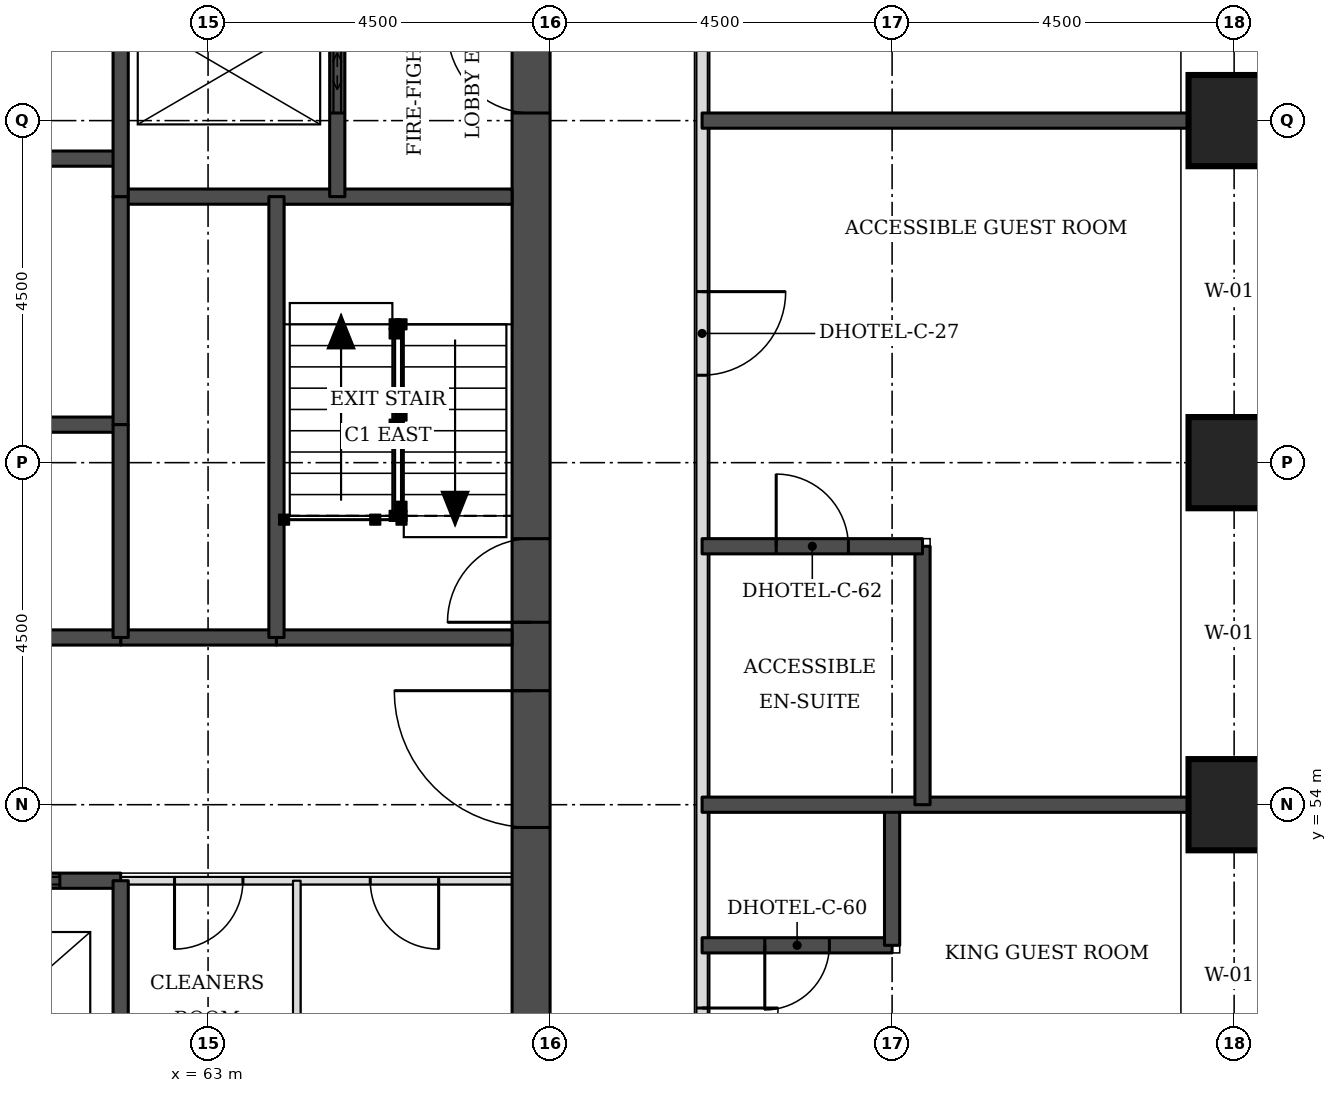
"""IFC4 building model, lengths in metres.
Left out: names, types, materials, properties, quantities, classifications, styles, units other than length and angle.
Written with IfcOpenShell. Run it as: python <this file> out.ifc"""

import sys

from ifc_helpers import new_model, si_unit, direction, frame, frame_2d, origin, origin_2d, place, context, subcontext, project, spatial, rectangle, extrude, element, fill, save


model = new_model("IFC4")
c1 = context("Model", 3, precision=1e-05, world=origin(), true_north=direction((0.0, 1.0)))
c2 = subcontext(c1, "Body", "Model", "MODEL_VIEW")
j1 = project(units=[si_unit("LENGTHUNIT", "METRE"), si_unit("PLANEANGLEUNIT", "RADIAN")], contexts=[c1])
p1 = place(None, origin())
s1 = spatial("IfcSite", under=j1, at=p1, CompositionType="ELEMENT")
p2 = place(p1, origin())
s2 = spatial("IfcBuilding", under=s1, at=p2, CompositionType="ELEMENT")
p3 = place(p2, frame((0.0, 0.0, 56.1)))
s3 = spatial("IfcBuildingStorey", under=s2, at=p3, CompositionType="ELEMENT", Elevation=56.1)
for number, where, z_axis, x_axis in (
    (1, (76.5, 54.0, 0.0), (0.0, 0.0, 1.0), (1.0, 0.0, 0.0)),
    (2, (76.5, 58.5, 0.0), (0.0, 0.0, 1.0), (1.0, 0.0, 0.0)),
    (3, (76.5, 63.0, 0.0), (0.0, 0.0, 1.0), (1.0, 0.0, 0.0)),
):
    element("IfcColumn", number, at=place(p3, frame(where, z_axis=z_axis, x_axis=x_axis)), inside=s3, PredefinedType="COLUMN", context=c2, shape_type="SweptSolid", body=[
        extrude(rectangle(XDim=1.2, YDim=1.2, at=origin_2d()), origin(), (0.0, 0.0, 1.0), 3.3),
    ])
p4 = place(p3, frame((67.25, 49.5, 0.0), z_axis=(0.0, 0.0, 1.0), x_axis=(0.0, 1.0, 0.0)))
e4 = element("IfcWall", 4, at=p4, inside=s3, PredefinedType="SHEAR", context=c2, shape_type="SweptSolid", body=[
    extrude(rectangle(XDim=22.5, YDim=0.5, at=frame_2d((11.25, 0.0))), origin(), (0.0, 0.0, 1.0), 3.3),
])
p5 = place(p4, frame((4.2, 0.0, 0.0)))
e5 = element("IfcOpeningElement", 5, at=p5, cuts=e4, PredefinedType="OPENING", context=c2, shape_type="SweptSolid", body=[
    extrude(rectangle(XDim=1.8, YDim=2.1, at=frame_2d((0.9, 1.05))), frame((0.0, 0.26, 0.0), z_axis=(0.0, -1.0, 0.0), x_axis=(1.0, 0.0, 0.0)), (0.0, 0.0, 1.0), 0.52),
])
p6 = place(p4, frame((6.9, 0.0, 0.0)))
e6 = element("IfcOpeningElement", 6, at=p6, cuts=e4, PredefinedType="OPENING", context=c2, shape_type="SweptSolid", body=[
    extrude(rectangle(XDim=1.1, YDim=2.1, at=frame_2d((0.55, 1.05))), frame((0.0, 0.26, 0.0), z_axis=(0.0, -1.0, 0.0), x_axis=(1.0, 0.0, 0.0)), (0.0, 0.0, 1.0), 0.52),
])
p7 = place(p4, frame((13.6, 0.0, 0.0)))
e7 = element("IfcOpeningElement", 7, at=p7, cuts=e4, PredefinedType="OPENING", context=c2, shape_type="SweptSolid", body=[
    extrude(rectangle(XDim=1.1, YDim=2.1, at=frame_2d((0.55, 1.05))), frame((0.0, 0.26, 0.0), z_axis=(0.0, -1.0, 0.0), x_axis=(1.0, 0.0, 0.0)), (0.0, 0.0, 1.0), 0.52),
])
p8 = place(p4, frame((16.5, 0.0, 0.0)))
e8 = element("IfcOpeningElement", 8, at=p8, cuts=e4, PredefinedType="OPENING", context=c2, shape_type="SweptSolid", body=[
    extrude(rectangle(XDim=1.8, YDim=2.1, at=frame_2d((0.9, 1.05))), frame((0.0, 0.26, 0.0), z_axis=(0.0, -1.0, 0.0), x_axis=(1.0, 0.0, 0.0)), (0.0, 0.0, 1.0), 0.52),
])
p9 = place(p3, frame((69.5, 47.5, 0.0), z_axis=(0.0, 0.0, 1.0), x_axis=(0.0, 1.0, 0.0)))
e9 = element("IfcWall", 9, at=p9, inside=s3, PredefinedType="PARTITIONING", context=c2, shape_type="SweptSolid", body=[
    extrude(rectangle(XDim=26.5, YDim=0.15, at=frame_2d((13.25, 0.0))), origin(), (0.0, 0.0, 1.0), 3.08),
])
p10 = place(p9, frame((25.053, 0.0, 0.0)))
e10 = element("IfcOpeningElement", 10, at=p10, cuts=e9, PredefinedType="OPENING", context=c2, shape_type="SweptSolid", body=[
    extrude(rectangle(XDim=1.0, YDim=2.1, at=frame_2d((0.5, 1.05))), frame((0.0, 0.085, 0.0), z_axis=(0.0, -1.0, 0.0), x_axis=(1.0, 0.0, 0.0)), (0.0, 0.0, 1.0), 0.17),
])
p11 = place(p9, frame((18.275, 0.0, 0.0)))
e11 = element("IfcOpeningElement", 11, at=p11, cuts=e9, PredefinedType="OPENING", context=c2, shape_type="SweptSolid", body=[
    extrude(rectangle(XDim=1.0, YDim=2.1, at=frame_2d((0.5, 1.05))), frame((0.0, 0.085, 0.0), z_axis=(0.0, -1.0, 0.0), x_axis=(1.0, 0.0, 0.0)), (0.0, 0.0, 1.0), 0.17),
])
p12 = place(p9, frame((12.15, 0.0, 0.0)))
e12 = element("IfcOpeningElement", 12, at=p12, cuts=e9, PredefinedType="OPENING", context=c2, shape_type="SweptSolid", body=[
    extrude(rectangle(XDim=1.1, YDim=2.1, at=frame_2d((0.55, 1.05))), frame((0.0, 0.085, 0.0), z_axis=(0.0, -1.0, 0.0), x_axis=(1.0, 0.0, 0.0)), (0.0, 0.0, 1.0), 0.17),
])
p13 = place(p9, frame((2.825, 0.0, 0.0)))
e13 = element("IfcOpeningElement", 13, at=p13, cuts=e9, PredefinedType="OPENING", context=c2, shape_type="SweptSolid", body=[
    extrude(rectangle(XDim=1.0, YDim=2.1, at=frame_2d((0.5, 1.05))), frame((0.0, 0.085, 0.0), z_axis=(0.0, -1.0, 0.0), x_axis=(1.0, 0.0, 0.0)), (0.0, 0.0, 1.0), 0.17),
])
p14 = place(p9, frame((0.447, 0.0, 0.0)))
e14 = element("IfcOpeningElement", 14, at=p14, cuts=e9, PredefinedType="OPENING", context=c2, shape_type="SweptSolid", body=[
    extrude(rectangle(XDim=1.0, YDim=2.1, at=frame_2d((0.5, 1.05))), frame((0.0, 0.085, 0.0), z_axis=(0.0, -1.0, 0.0), x_axis=(1.0, 0.0, 0.0)), (0.0, 0.0, 1.0), 0.17),
])
p15 = place(p3, frame((69.5, 52.15, 0.0), z_axis=(0.0, 0.0, 1.0), x_axis=(1.0, 0.0, 0.0)))
e15 = element("IfcWall", 15, at=p15, inside=s3, PredefinedType="SOLIDWALL", context=c2, shape_type="SweptSolid", body=[
    extrude(rectangle(XDim=2.5, YDim=0.2, at=frame_2d((1.25, 0.0))), origin(), (0.0, 0.0, 1.0), 3.08),
])
p16 = place(p15, frame((0.825, 0.0, 0.0)))
e16 = element("IfcOpeningElement", 16, at=p16, cuts=e15, PredefinedType="OPENING", context=c2, shape_type="SweptSolid", body=[
    extrude(rectangle(XDim=0.85, YDim=2.1, at=frame_2d((0.425, 1.05))), frame((0.0, 0.11, 0.0), z_axis=(0.0, -1.0, 0.0), x_axis=(1.0, 0.0, 0.0)), (0.0, 0.0, 1.0), 0.22),
])
p17 = place(p3, frame((72.0, 52.15, 0.0), z_axis=(0.0, 0.0, 1.0), x_axis=(0.0, 1.0, 0.0)))
e17 = element("IfcWall", 17, at=p17, inside=s3, PredefinedType="SOLIDWALL", context=c2, shape_type="SweptSolid", body=[
    extrude(rectangle(XDim=1.85, YDim=0.2, at=frame_2d((0.925, 0.0))), origin(), (0.0, 0.0, 1.0), 3.08),
])
p18 = place(p3, frame((69.5, 54.0, 0.0), z_axis=(0.0, 0.0, 1.0), x_axis=(1.0, 0.0, 0.0)))
e18 = element("IfcWall", 18, at=p18, inside=s3, PredefinedType="SOLIDWALL", context=c2, shape_type="SweptSolid", body=[
    extrude(rectangle(XDim=6.4, YDim=0.2, at=frame_2d((3.2, 0.0))), origin(), (0.0, 0.0, 1.0), 3.08),
])
p19 = place(p3, frame((72.4, 54.0, 0.0), z_axis=(0.0, 0.0, 1.0), x_axis=(0.0, 1.0, 0.0)))
e19 = element("IfcWall", 19, at=p19, inside=s3, PredefinedType="SOLIDWALL", context=c2, shape_type="SweptSolid", body=[
    extrude(rectangle(XDim=3.4, YDim=0.2, at=frame_2d((1.7, 0.0))), origin(), (0.0, 0.0, 1.0), 3.08),
])
p20 = place(p3, frame((69.5, 57.4, 0.0), z_axis=(0.0, 0.0, 1.0), x_axis=(1.0, 0.0, 0.0)))
e20 = element("IfcWall", 20, at=p20, inside=s3, PredefinedType="SOLIDWALL", context=c2, shape_type="SweptSolid", body=[
    extrude(rectangle(XDim=2.9, YDim=0.2, at=frame_2d((1.45, 0.0))), origin(), (0.0, 0.0, 1.0), 3.08),
])
p21 = place(p20, frame((0.975, 0.0, 0.0)))
e21 = element("IfcOpeningElement", 21, at=p21, cuts=e20, PredefinedType="OPENING", context=c2, shape_type="SweptSolid", body=[
    extrude(rectangle(XDim=0.95, YDim=2.1, at=frame_2d((0.475, 1.05))), frame((0.0, 0.11, 0.0), z_axis=(0.0, -1.0, 0.0), x_axis=(1.0, 0.0, 0.0)), (0.0, 0.0, 1.0), 0.22),
])
p22 = place(p3, frame((69.5, 63.0, 0.0), z_axis=(0.0, 0.0, 1.0), x_axis=(1.0, 0.0, 0.0)))
e22 = element("IfcWall", 22, at=p22, inside=s3, PredefinedType="SOLIDWALL", context=c2, shape_type="SweptSolid", body=[
    extrude(rectangle(XDim=6.4, YDim=0.2, at=frame_2d((3.2, 0.0))), origin(), (0.0, 0.0, 1.0), 3.08),
])
p23 = place(p3, frame((61.85, 53.0, 0.0), z_axis=(0.0, 0.0, 1.0), x_axis=(1.0, 0.0, 0.0)))
e23 = element("IfcWall", 23, at=p23, inside=s3, PredefinedType="PARTITIONING", context=c2, shape_type="SweptSolid", body=[
    extrude(rectangle(XDim=5.15, YDim=0.1, at=frame_2d((2.575, 0.0))), origin(), (0.0, 0.0, 1.0), 3.08),
])
p24 = place(p23, frame((3.284, 0.0, 0.0)))
e24 = element("IfcOpeningElement", 24, at=p24, cuts=e23, PredefinedType="OPENING", context=c2, shape_type="SweptSolid", body=[
    extrude(rectangle(XDim=0.9, YDim=2.1, at=frame_2d((0.45, 1.05))), frame((0.0, 0.06, 0.0), z_axis=(0.0, -1.0, 0.0), x_axis=(1.0, 0.0, 0.0)), (0.0, 0.0, 1.0), 0.12),
])
p25 = place(p23, frame((0.709, 0.0, 0.0)))
e25 = element("IfcOpeningElement", 25, at=p25, cuts=e23, PredefinedType="OPENING", context=c2, shape_type="SweptSolid", body=[
    extrude(rectangle(XDim=0.9, YDim=2.1, at=frame_2d((0.45, 1.05))), frame((0.0, 0.06, 0.0), z_axis=(0.0, -1.0, 0.0), x_axis=(1.0, 0.0, 0.0)), (0.0, 0.0, 1.0), 0.12),
])
p26 = place(p3, frame((50.65, 53.0, 0.0), z_axis=(0.0, 0.0, 1.0), x_axis=(1.0, 0.0, 0.0)))
e26 = element("IfcWall", 26, at=p26, inside=s3, PredefinedType="SOLIDWALL", context=c2, shape_type="SweptSolid", body=[
    extrude(rectangle(XDim=11.2, YDim=0.2, at=frame_2d((5.6, 0.0))), origin(), (0.0, 0.0, 1.0), 3.08),
])
p27 = place(p26, frame((0.8, 0.0, 0.0)))
e27 = element("IfcOpeningElement", 27, at=p27, cuts=e26, PredefinedType="OPENING", context=c2, shape_type="SweptSolid", body=[
    extrude(rectangle(XDim=1.2, YDim=2.1, at=frame_2d((0.6, 1.05))), frame((0.0, 0.11, 0.0), z_axis=(0.0, -1.0, 0.0), x_axis=(1.0, 0.0, 0.0)), (0.0, 0.0, 1.0), 0.22),
])
p28 = place(p26, frame((3.6, 0.0, 0.0)))
e28 = element("IfcOpeningElement", 28, at=p28, cuts=e26, PredefinedType="OPENING", context=c2, shape_type="SweptSolid", body=[
    extrude(rectangle(XDim=1.2, YDim=2.1, at=frame_2d((0.6, 1.05))), frame((0.0, 0.11, 0.0), z_axis=(0.0, -1.0, 0.0), x_axis=(1.0, 0.0, 0.0)), (0.0, 0.0, 1.0), 0.22),
])
p29 = place(p26, frame((6.4, 0.0, 0.0)))
e29 = element("IfcOpeningElement", 29, at=p29, cuts=e26, PredefinedType="OPENING", context=c2, shape_type="SweptSolid", body=[
    extrude(rectangle(XDim=1.2, YDim=2.1, at=frame_2d((0.6, 1.05))), frame((0.0, 0.11, 0.0), z_axis=(0.0, -1.0, 0.0), x_axis=(1.0, 0.0, 0.0)), (0.0, 0.0, 1.0), 0.22),
])
p30 = place(p26, frame((9.2, 0.0, 0.0)))
e30 = element("IfcOpeningElement", 30, at=p30, cuts=e26, PredefinedType="OPENING", context=c2, shape_type="SweptSolid", body=[
    extrude(rectangle(XDim=1.2, YDim=2.1, at=frame_2d((0.6, 1.05))), frame((0.0, 0.11, 0.0), z_axis=(0.0, -1.0, 0.0), x_axis=(1.0, 0.0, 0.0)), (0.0, 0.0, 1.0), 0.22),
])
p31 = place(p3, frame((61.85, 56.2, 0.0), z_axis=(0.0, 0.0, 1.0), x_axis=(1.0, 0.0, 0.0)))
e31 = element("IfcWall", 31, at=p31, inside=s3, PredefinedType="SOLIDWALL", context=c2, shape_type="SweptSolid", body=[
    extrude(rectangle(XDim=2.05, YDim=0.2, at=frame_2d((1.025, 0.0))), origin(), (0.0, 0.0, 1.0), 3.08),
])
p32 = place(p3, frame((50.65, 56.2, 0.0), z_axis=(0.0, 0.0, 1.0), x_axis=(1.0, 0.0, 0.0)))
e32 = element("IfcWall", 32, at=p32, inside=s3, PredefinedType="SOLIDWALL", context=c2, shape_type="SweptSolid", body=[
    extrude(rectangle(XDim=11.2, YDim=0.2, at=frame_2d((5.6, 0.0))), origin(), (0.0, 0.0, 1.0), 3.08),
])
p33 = place(p3, frame((63.9, 56.2, 0.0), z_axis=(0.0, 0.0, 1.0), x_axis=(1.0, 0.0, 0.0)))
e33 = element("IfcWall", 33, at=p33, inside=s3, PredefinedType="SOLIDWALL", context=c2, shape_type="SweptSolid", body=[
    extrude(rectangle(XDim=3.1, YDim=0.2, at=frame_2d((1.55, 0.0))), origin(), (0.0, 0.0, 1.0), 3.08),
])
p34 = place(p3, frame((50.65, 59.0, 0.0), z_axis=(0.0, 0.0, 1.0), x_axis=(1.0, 0.0, 0.0)))
e34 = element("IfcWall", 34, at=p34, inside=s3, PredefinedType="SOLIDWALL", context=c2, shape_type="SweptSolid", body=[
    extrude(rectangle(XDim=11.2, YDim=0.2, at=frame_2d((5.6, 0.0))), origin(), (0.0, 0.0, 1.0), 3.3),
])
p35 = place(p3, frame((61.85, 62.0, 0.0), z_axis=(0.0, 0.0, 1.0), x_axis=(1.0, 0.0, 0.0)))
e35 = element("IfcWall", 35, at=p35, inside=s3, PredefinedType="SOLIDWALL", context=c2, shape_type="SweptSolid", body=[
    extrude(rectangle(XDim=5.15, YDim=0.2, at=frame_2d((2.575, 0.0))), origin(), (0.0, 0.0, 1.0), 3.08),
])
p36 = place(p3, frame((50.65, 62.5, 0.0), z_axis=(0.0, 0.0, 1.0), x_axis=(1.0, 0.0, 0.0)))
e36 = element("IfcWall", 36, at=p36, inside=s3, PredefinedType="SOLIDWALL", context=c2, shape_type="SweptSolid", body=[
    extrude(rectangle(XDim=11.2, YDim=0.2, at=frame_2d((5.6, 0.0))), origin(), (0.0, 0.0, 1.0), 3.3),
])
p37 = place(p3, frame((61.85, 59.0, 0.0), z_axis=(0.0, 0.0, 1.0), x_axis=(0.0, 1.0, 0.0)))
e37 = element("IfcWall", 37, at=p37, inside=s3, PredefinedType="SOLIDWALL", context=c2, shape_type="SweptSolid", body=[
    extrude(rectangle(XDim=3.0, YDim=0.2, at=frame_2d((1.5, 0.0))), origin(), (0.0, 0.0, 1.0), 3.3),
])
p38 = place(p3, frame((61.85, 50.0, 0.0), z_axis=(0.0, 0.0, 1.0), x_axis=(0.0, 1.0, 0.0)))
e38 = element("IfcWall", 38, at=p38, inside=s3, PredefinedType="SOLIDWALL", context=c2, shape_type="SweptSolid", body=[
    extrude(rectangle(XDim=3.0, YDim=0.2, at=frame_2d((1.5, 0.0))), origin(), (0.0, 0.0, 1.0), 3.08),
])
p39 = place(p3, frame((61.85, 56.2, 0.0), z_axis=(0.0, 0.0, 1.0), x_axis=(0.0, 1.0, 0.0)))
e39 = element("IfcWall", 39, at=p39, inside=s3, PredefinedType="SOLIDWALL", context=c2, shape_type="SweptSolid", body=[
    extrude(rectangle(XDim=2.8, YDim=0.2, at=frame_2d((1.4, 0.0))), origin(), (0.0, 0.0, 1.0), 3.08),
])
p40 = place(p3, frame((61.85, 62.0, 0.0), z_axis=(0.0, 0.0, 1.0), x_axis=(0.0, 1.0, 0.0)))
e40 = element("IfcWall", 40, at=p40, inside=s3, PredefinedType="SOLIDWALL", context=c2, shape_type="SweptSolid", body=[
    extrude(rectangle(XDim=3.3, YDim=0.2, at=frame_2d((1.65, 0.0))), origin(), (0.0, 0.0, 1.0), 3.08),
])
p41 = place(p3, frame((63.9, 56.2, 0.0), z_axis=(0.0, 0.0, 1.0), x_axis=(0.0, 1.0, 0.0)))
e41 = element("IfcWall", 41, at=p41, inside=s3, PredefinedType="SOLIDWALL", context=c2, shape_type="SweptSolid", body=[
    extrude(rectangle(XDim=5.8, YDim=0.2, at=frame_2d((2.9, 0.0))), origin(), (0.0, 0.0, 1.0), 3.08),
])
p42 = place(p3, frame((64.167, 50.0, 0.0), z_axis=(0.0, 0.0, 1.0), x_axis=(0.0, 1.0, 0.0)))
e42 = element("IfcWall", 42, at=p42, inside=s3, PredefinedType="PARTITIONING", context=c2, shape_type="SweptSolid", body=[
    extrude(rectangle(XDim=3.0, YDim=0.1, at=frame_2d((1.5, 0.0))), origin(), (0.0, 0.0, 1.0), 3.08),
])
p43 = place(p3, frame((64.7, 62.0, 0.0), z_axis=(0.0, 0.0, 1.0), x_axis=(0.0, 1.0, 0.0)))
e43 = element("IfcWall", 43, at=p43, inside=s3, PredefinedType="SOLIDWALL", context=c2, shape_type="SweptSolid", body=[
    extrude(rectangle(XDim=3.3, YDim=0.2, at=frame_2d((1.65, 0.0))), origin(), (0.0, 0.0, 1.0), 3.08),
])
p44 = place(p43, frame((1.1, 0.0, 0.0)))
e44 = element("IfcOpeningElement", 44, at=p44, cuts=e43, PredefinedType="OPENING", context=c2, shape_type="SweptSolid", body=[
    extrude(rectangle(XDim=1.1, YDim=2.1, at=frame_2d((0.55, 1.05))), frame((0.0, 0.11, 0.0), z_axis=(0.0, -1.0, 0.0), x_axis=(1.0, 0.0, 0.0)), (0.0, 0.0, 1.0), 0.22),
])
p45 = place(p12, frame((1.1, 0.0, 0.0), z_axis=(0.0, 0.0, 1.0), x_axis=(-1.0, 0.0, 0.0)))
e45 = element("IfcDoor", 45, at=p45, inside=s3, OperationType="SINGLE_SWING_LEFT", PredefinedType="DOOR", context=c2, shape_type="SweptSolid", body=[
    extrude(rectangle(XDim=1.1, YDim=2.1, at=frame_2d((0.55, 1.05))), frame((0.0, 0.025, 0.0), z_axis=(0.0, -1.0, 0.0), x_axis=(1.0, 0.0, 0.0)), (0.0, 0.0, 1.0), 0.05),
])
fill(e12, e45)
p46 = place(p21, origin())
e46 = element("IfcDoor", 46, at=p46, inside=s3, OperationType="SINGLE_SWING_LEFT", PredefinedType="DOOR", context=c2, shape_type="SweptSolid", body=[
    extrude(rectangle(XDim=0.95, YDim=2.1, at=frame_2d((0.475, 1.05))), frame((0.0, 0.025, 0.0), z_axis=(0.0, -1.0, 0.0), x_axis=(1.0, 0.0, 0.0)), (0.0, 0.0, 1.0), 0.05),
])
fill(e21, e46)
p47 = place(p13, frame((1.0, 0.0, 0.0), z_axis=(0.0, 0.0, 1.0), x_axis=(-1.0, 0.0, 0.0)))
e47 = element("IfcDoor", 47, at=p47, inside=s3, OperationType="SINGLE_SWING_LEFT", PredefinedType="DOOR", context=c2, shape_type="SweptSolid", body=[
    extrude(rectangle(XDim=1.0, YDim=2.1, at=frame_2d((0.5, 1.05))), frame((0.0, 0.025, 0.0), z_axis=(0.0, -1.0, 0.0), x_axis=(1.0, 0.0, 0.0)), (0.0, 0.0, 1.0), 0.05),
])
fill(e13, e47)
p48 = place(p16, frame((0.85, 0.0, 0.0), z_axis=(0.0, 0.0, 1.0), x_axis=(-1.0, 0.0, 0.0)))
e48 = element("IfcDoor", 48, at=p48, inside=s3, OperationType="SINGLE_SWING_RIGHT", PredefinedType="DOOR", context=c2, shape_type="SweptSolid", body=[
    extrude(rectangle(XDim=0.85, YDim=2.1, at=frame_2d((0.425, 1.05))), frame((0.0, 0.025, 0.0), z_axis=(0.0, -1.0, 0.0), x_axis=(1.0, 0.0, 0.0)), (0.0, 0.0, 1.0), 0.05),
])
fill(e16, e48)
p49 = place(p30, origin())
e49 = element("IfcDoor", 49, at=p49, inside=s3, OperationType="DOUBLE_DOOR_SLIDING", PredefinedType="DOOR", context=c2, shape_type="SweptSolid", body=[
    extrude(rectangle(XDim=1.2, YDim=2.1, at=frame_2d((0.6, 1.05))), frame((0.0, 0.025, 0.0), z_axis=(0.0, -1.0, 0.0), x_axis=(1.0, 0.0, 0.0)), (0.0, 0.0, 1.0), 0.05),
])
fill(e30, e49)
p50 = place(p44, origin())
e50 = element("IfcDoor", 50, at=p50, inside=s3, OperationType="DOUBLE_DOOR_SLIDING", PredefinedType="DOOR", context=c2, shape_type="SweptSolid", body=[
    extrude(rectangle(XDim=1.1, YDim=2.1, at=frame_2d((0.55, 1.05))), frame((0.0, 0.025, 0.0), z_axis=(0.0, -1.0, 0.0), x_axis=(1.0, 0.0, 0.0)), (0.0, 0.0, 1.0), 0.05),
])
fill(e44, e50)
p51 = place(p5, origin())
e51 = element("IfcDoor", 51, at=p51, inside=s3, OperationType="SINGLE_SWING_RIGHT", PredefinedType="DOOR", context=c2, shape_type="SweptSolid", body=[
    extrude(rectangle(XDim=1.8, YDim=2.1, at=frame_2d((0.9, 1.05))), frame((0.0, 0.025, 0.0), z_axis=(0.0, -1.0, 0.0), x_axis=(1.0, 0.0, 0.0)), (0.0, 0.0, 1.0), 0.05),
])
fill(e5, e51)
p52 = place(p6, origin())
e52 = element("IfcDoor", 52, at=p52, inside=s3, OperationType="SINGLE_SWING_LEFT", PredefinedType="DOOR", context=c2, shape_type="SweptSolid", body=[
    extrude(rectangle(XDim=1.1, YDim=2.1, at=frame_2d((0.55, 1.05))), frame((0.0, 0.025, 0.0), z_axis=(0.0, -1.0, 0.0), x_axis=(1.0, 0.0, 0.0)), (0.0, 0.0, 1.0), 0.05),
])
fill(e6, e52)
p53 = place(p7, origin())
e53 = element("IfcDoor", 53, at=p53, inside=s3, OperationType="SINGLE_SWING_RIGHT", PredefinedType="DOOR", context=c2, shape_type="SweptSolid", body=[
    extrude(rectangle(XDim=1.1, YDim=2.1, at=frame_2d((0.55, 1.05))), frame((0.0, 0.025, 0.0), z_axis=(0.0, -1.0, 0.0), x_axis=(1.0, 0.0, 0.0)), (0.0, 0.0, 1.0), 0.05),
])
fill(e7, e53)
p54 = place(p24, frame((0.9, 0.0, 0.0), z_axis=(0.0, 0.0, 1.0), x_axis=(-1.0, 0.0, 0.0)))
e54 = element("IfcDoor", 54, at=p54, inside=s3, OperationType="SINGLE_SWING_LEFT", PredefinedType="DOOR", context=c2, shape_type="SweptSolid", body=[
    extrude(rectangle(XDim=0.9, YDim=2.1, at=frame_2d((0.45, 1.05))), frame((0.0, 0.025, 0.0), z_axis=(0.0, -1.0, 0.0), x_axis=(1.0, 0.0, 0.0)), (0.0, 0.0, 1.0), 0.05),
])
fill(e24, e54)
p55 = place(p25, frame((0.9, 0.0, 0.0), z_axis=(0.0, 0.0, 1.0), x_axis=(-1.0, 0.0, 0.0)))
e55 = element("IfcDoor", 55, at=p55, inside=s3, OperationType="SINGLE_SWING_RIGHT", PredefinedType="DOOR", context=c2, shape_type="SweptSolid", body=[
    extrude(rectangle(XDim=0.9, YDim=2.1, at=frame_2d((0.45, 1.05))), frame((0.0, 0.025, 0.0), z_axis=(0.0, -1.0, 0.0), x_axis=(1.0, 0.0, 0.0)), (0.0, 0.0, 1.0), 0.05),
])
fill(e25, e55)
save(model, sys.argv[1])
